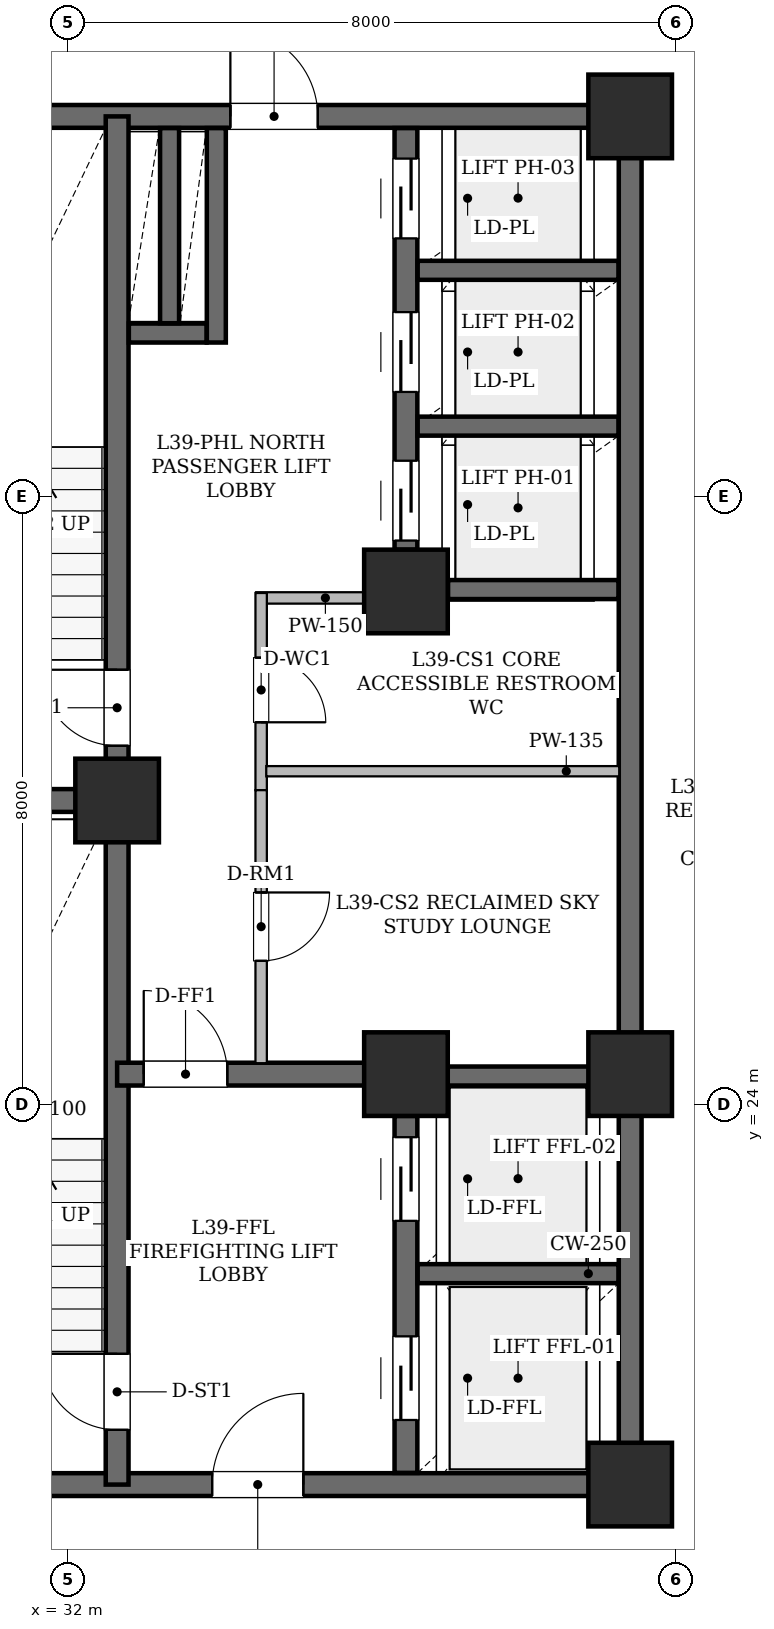
"""IFC4 building model, lengths in metres.
Left out: names, types, materials, properties, quantities, classifications, styles, units other than length and angle.
Written with IfcOpenShell. Run it as: python <this file> out.ifc"""

import sys

from ifc_helpers import new_model, si_unit, direction, frame, frame_2d, origin, origin_2d, place, context, subcontext, project, spatial, rectangle, hollow_rectangle, extrude, element, fill, save


model = new_model("IFC4")
c1 = context("Model", 3, precision=1e-05, world=origin(), true_north=direction((0.0, 1.0)))
c2 = subcontext(c1, "Body", "Model", "MODEL_VIEW")
j1 = project(units=[si_unit("LENGTHUNIT", "METRE"), si_unit("PLANEANGLEUNIT", "RADIAN")], contexts=[c1])
p1 = place(None, origin())
s1 = spatial("IfcSite", under=j1, at=p1, CompositionType="ELEMENT")
p2 = place(p1, origin())
s2 = spatial("IfcBuilding", under=s1, at=p2, CompositionType="ELEMENT")
p3 = place(p2, frame((0.0, 0.0, 155.9)))
s3 = spatial("IfcBuildingStorey", under=s2, at=p3, CompositionType="ELEMENT", Elevation=155.9)
for number, where, z_axis, x_axis in (
    (1, (32.65, 28.0, 0.0), (0.0, 0.0, 1.0), (1.0, 0.0, 0.0)),
    (2, (39.4, 19.0, 0.0), (0.0, 0.0, 1.0), (1.0, 0.0, 0.0)),
    (3, (36.45, 24.4, 0.0), (0.0, 0.0, 1.0), (1.0, 0.0, 0.0)),
    (4, (39.4, 24.4, 0.0), (0.0, 0.0, 1.0), (1.0, 0.0, 0.0)),
    (5, (36.45, 30.75, 0.0), (0.0, 0.0, 1.0), (1.0, 0.0, 0.0)),
    (6, (39.4, 37.0, 0.0), (0.0, 0.0, 1.0), (1.0, 0.0, 0.0)),
):
    element("IfcColumn", number, at=place(p3, frame(where, z_axis=z_axis, x_axis=x_axis)), inside=s3, PredefinedType="COLUMN", context=c2, shape_type="SweptSolid", body=[
        extrude(hollow_rectangle(XDim=1.1, YDim=1.1, WallThickness=0.055, at=origin_2d()), origin(), (0.0, 0.0, 1.0), 3.65),
    ])
p4 = place(p3, frame((29.0, 19.0, 0.0), z_axis=(0.0, 0.0, 1.0), x_axis=(1.0, 0.0, 0.0)))
e7 = element("IfcWall", 7, at=p4, inside=s3, PredefinedType="SHEAR", context=c2, shape_type="SweptSolid", body=[
    extrude(rectangle(XDim=10.4, YDim=0.3, at=frame_2d((5.2, 0.0))), origin(), (0.0, 0.0, 1.0), 3.43),
])
p5 = place(p4, frame((4.9, 0.0, 0.0)))
e8 = element("IfcOpeningElement", 8, at=p5, cuts=e7, PredefinedType="OPENING", context=c2, shape_type="SweptSolid", body=[
    extrude(rectangle(XDim=1.2, YDim=2.15, at=frame_2d((0.6, 1.075))), frame((0.0, 0.16, 0.0), z_axis=(0.0, -1.0, 0.0), x_axis=(1.0, 0.0, 0.0)), (0.0, 0.0, 1.0), 0.32),
])
p6 = place(p3, frame((29.0, 37.0, 0.0), z_axis=(0.0, 0.0, 1.0), x_axis=(1.0, 0.0, 0.0)))
e9 = element("IfcWall", 9, at=p6, inside=s3, PredefinedType="SHEAR", context=c2, shape_type="SweptSolid", body=[
    extrude(rectangle(XDim=10.4, YDim=0.3, at=frame_2d((5.2, 0.0))), origin(), (0.0, 0.0, 1.0), 3.43),
])
p7 = place(p6, frame((5.14, 0.0, 0.0)))
e10 = element("IfcOpeningElement", 10, at=p7, cuts=e9, PredefinedType="OPENING", context=c2, shape_type="SweptSolid", body=[
    extrude(rectangle(XDim=1.15, YDim=2.2, at=frame_2d((0.575, 1.1))), frame((0.0, 0.16, 0.0), z_axis=(0.0, -1.0, 0.0), x_axis=(1.0, 0.0, 0.0)), (0.0, 0.0, 1.0), 0.32),
])
p8 = place(p3, frame((39.4, 19.0, 0.0), z_axis=(0.0, 0.0, 1.0), x_axis=(0.0, 1.0, 0.0)))
e11 = element("IfcWall", 11, at=p8, inside=s3, PredefinedType="SHEAR", context=c2, shape_type="SweptSolid", body=[
    extrude(rectangle(XDim=5.4, YDim=0.3, at=frame_2d((2.7, 0.0))), origin(), (0.0, 0.0, 1.0), 3.43),
])
p9 = place(p3, frame((39.4, 24.4, 0.0), z_axis=(0.0, 0.0, 1.0), x_axis=(0.0, 1.0, 0.0)))
e12 = element("IfcWall", 12, at=p9, inside=s3, PredefinedType="SHEAR", context=c2, shape_type="SweptSolid", body=[
    extrude(rectangle(XDim=12.6, YDim=0.3, at=frame_2d((6.3, 0.0))), origin(), (0.0, 0.0, 1.0), 3.43),
])
p10 = place(p3, frame((32.65, 19.0, 0.0), z_axis=(0.0, 0.0, 1.0), x_axis=(0.0, 1.0, 0.0)))
e13 = element("IfcWall", 13, at=p10, inside=s3, PredefinedType="SHEAR", context=c2, shape_type="SweptSolid", body=[
    extrude(rectangle(XDim=9.0, YDim=0.3, at=frame_2d((4.5, 0.0))), origin(), (0.0, 0.0, 1.0), 3.43),
])
p11 = place(p10, frame((0.72, 0.0, 0.0)))
e14 = element("IfcOpeningElement", 14, at=p11, cuts=e13, PredefinedType="OPENING", context=c2, shape_type="SweptSolid", body=[
    extrude(rectangle(XDim=1.0, YDim=2.15, at=frame_2d((0.5, 1.075))), frame((0.0, 0.16, 0.0), z_axis=(0.0, -1.0, 0.0), x_axis=(1.0, 0.0, 0.0)), (0.0, 0.0, 1.0), 0.32),
])
p12 = place(p3, frame((32.65, 28.0, 0.0), z_axis=(0.0, 0.0, 1.0), x_axis=(0.0, 1.0, 0.0)))
e15 = element("IfcWall", 15, at=p12, inside=s3, PredefinedType="SHEAR", context=c2, shape_type="SweptSolid", body=[
    extrude(rectangle(XDim=9.0, YDim=0.3, at=frame_2d((4.5, 0.0))), origin(), (0.0, 0.0, 1.0), 3.43),
])
p13 = place(p12, frame((0.72, 0.0, 0.0)))
e16 = element("IfcOpeningElement", 16, at=p13, cuts=e15, PredefinedType="OPENING", context=c2, shape_type="SweptSolid", body=[
    extrude(rectangle(XDim=1.0, YDim=2.15, at=frame_2d((0.5, 1.075))), frame((0.0, 0.16, 0.0), z_axis=(0.0, -1.0, 0.0), x_axis=(1.0, 0.0, 0.0)), (0.0, 0.0, 1.0), 0.32),
])
p14 = place(p3, frame((29.0, 28.0, 0.0), z_axis=(0.0, 0.0, 1.0), x_axis=(1.0, 0.0, 0.0)))
e17 = element("IfcWall", 17, at=p14, inside=s3, PredefinedType="SHEAR", context=c2, shape_type="SweptSolid", body=[
    extrude(rectangle(XDim=3.65, YDim=0.3, at=frame_2d((1.825, 0.0))), origin(), (0.0, 0.0, 1.0), 3.43),
])
p15 = place(p3, frame((32.65, 24.4, 0.0), z_axis=(0.0, 0.0, 1.0), x_axis=(1.0, 0.0, 0.0)))
e18 = element("IfcWall", 18, at=p15, inside=s3, PredefinedType="SHEAR", context=c2, shape_type="SweptSolid", body=[
    extrude(rectangle(XDim=3.8, YDim=0.3, at=frame_2d((1.9, 0.0))), origin(), (0.0, 0.0, 1.0), 3.43),
])
p16 = place(p15, frame((0.35, 0.0, 0.0)))
e19 = element("IfcOpeningElement", 19, at=p16, cuts=e18, PredefinedType="OPENING", context=c2, shape_type="SweptSolid", body=[
    extrude(rectangle(XDim=1.1, YDim=2.15, at=frame_2d((0.55, 1.075))), frame((0.0, 0.16, 0.0), z_axis=(0.0, -1.0, 0.0), x_axis=(1.0, 0.0, 0.0)), (0.0, 0.0, 1.0), 0.32),
])
p17 = place(p3, frame((36.45, 19.154, 0.0), z_axis=(0.0, 0.0, 1.0), x_axis=(0.0, 1.0, 0.0)))
e20 = element("IfcWall", 20, at=p17, inside=s3, PredefinedType="SHEAR", context=c2, shape_type="SweptSolid", body=[
    extrude(rectangle(XDim=4.696, YDim=0.3, at=frame_2d((2.348, 0.0))), origin(), (0.0, 0.0, 1.0), 3.43),
])
p18 = place(p17, frame((0.696, 0.0, 0.0)))
e21 = element("IfcOpeningElement", 21, at=p18, cuts=e20, PredefinedType="OPENING", context=c2, shape_type="SweptSolid", body=[
    extrude(rectangle(XDim=1.1, YDim=2.15, at=frame_2d((0.55, 1.075))), frame((0.0, 0.16, 0.0), z_axis=(0.0, -1.0, 0.0), x_axis=(1.0, 0.0, 0.0)), (0.0, 0.0, 1.0), 0.32),
])
p19 = place(p17, frame((3.316, 0.0, 0.0)))
e22 = element("IfcOpeningElement", 22, at=p19, cuts=e20, PredefinedType="OPENING", context=c2, shape_type="SweptSolid", body=[
    extrude(rectangle(XDim=1.1, YDim=2.15, at=frame_2d((0.55, 1.075))), frame((0.0, 0.16, 0.0), z_axis=(0.0, -1.0, 0.0), x_axis=(1.0, 0.0, 0.0)), (0.0, 0.0, 1.0), 0.32),
])
p20 = place(p3, frame((36.45, 31.3, 0.0), z_axis=(0.0, 0.0, 1.0), x_axis=(0.0, 1.0, 0.0)))
e23 = element("IfcWall", 23, at=p20, inside=s3, PredefinedType="SHEAR", context=c2, shape_type="SweptSolid", body=[
    extrude(rectangle(XDim=5.546, YDim=0.3, at=frame_2d((2.773, 0.0))), origin(), (0.0, 0.0, 1.0), 3.43),
])
p21 = place(p20, frame((0.12, 0.0, 0.0)))
e24 = element("IfcOpeningElement", 24, at=p21, cuts=e23, PredefinedType="OPENING", context=c2, shape_type="SweptSolid", body=[
    extrude(rectangle(XDim=1.05, YDim=2.15, at=frame_2d((0.525, 1.075))), frame((0.0, 0.16, 0.0), z_axis=(0.0, -1.0, 0.0), x_axis=(1.0, 0.0, 0.0)), (0.0, 0.0, 1.0), 0.32),
])
p22 = place(p20, frame((2.075, 0.0, 0.0)))
e25 = element("IfcOpeningElement", 25, at=p22, cuts=e23, PredefinedType="OPENING", context=c2, shape_type="SweptSolid", body=[
    extrude(rectangle(XDim=1.05, YDim=2.15, at=frame_2d((0.525, 1.075))), frame((0.0, 0.16, 0.0), z_axis=(0.0, -1.0, 0.0), x_axis=(1.0, 0.0, 0.0)), (0.0, 0.0, 1.0), 0.32),
])
p23 = place(p20, frame((4.095, 0.0, 0.0)))
e26 = element("IfcOpeningElement", 26, at=p23, cuts=e23, PredefinedType="OPENING", context=c2, shape_type="SweptSolid", body=[
    extrude(rectangle(XDim=1.05, YDim=2.15, at=frame_2d((0.525, 1.075))), frame((0.0, 0.16, 0.0), z_axis=(0.0, -1.0, 0.0), x_axis=(1.0, 0.0, 0.0)), (0.0, 0.0, 1.0), 0.32),
])
for number, where, z_axis, x_axis in (
    (27, (36.604, 21.775, 0.0), (0.0, 0.0, 1.0), (1.0, 0.0, 0.0)),
    (28, (36.604, 24.375, 0.0), (0.0, 0.0, 1.0), (1.0, 0.0, 0.0)),
):
    element("IfcWall", number, at=place(p3, frame(where, z_axis=z_axis, x_axis=x_axis)), inside=s3, PredefinedType="SHEAR", context=c2, shape_type="SweptSolid", body=[
        extrude(rectangle(XDim=2.642, YDim=0.25, at=frame_2d((1.321, 0.0))), origin(), (0.0, 0.0, 1.0), 3.43),
    ])
p24 = place(p3, frame((37.004, 30.775, 0.0), z_axis=(0.0, 0.0, 1.0), x_axis=(1.0, 0.0, 0.0)))
e29 = element("IfcWall", 29, at=p24, inside=s3, PredefinedType="SHEAR", context=c2, shape_type="SweptSolid", body=[
    extrude(rectangle(XDim=2.242, YDim=0.25, at=frame_2d((1.121, 0.0))), origin(), (0.0, 0.0, 1.0), 3.43),
])
for number, where, z_axis, x_axis in (
    (30, (36.604, 32.925, 0.0), (0.0, 0.0, 1.0), (1.0, 0.0, 0.0)),
    (31, (36.604, 34.975, 0.0), (0.0, 0.0, 1.0), (1.0, 0.0, 0.0)),
):
    element("IfcWall", number, at=place(p3, frame(where, z_axis=z_axis, x_axis=x_axis)), inside=s3, PredefinedType="SHEAR", context=c2, shape_type="SweptSolid", body=[
        extrude(rectangle(XDim=2.642, YDim=0.25, at=frame_2d((1.321, 0.0))), origin(), (0.0, 0.0, 1.0), 3.43),
    ])
p25 = place(p3, frame((33.955, 34.025, 0.0), z_axis=(0.0, 0.0, 1.0), x_axis=(0.0, 1.0, 0.0)))
e32 = element("IfcWall", 32, at=p25, inside=s3, PredefinedType="SHEAR", context=c2, shape_type="SweptSolid", body=[
    extrude(rectangle(XDim=2.821, YDim=0.25, at=frame_2d((1.411, 0.0))), origin(), (0.0, 0.0, 1.0), 3.43),
])
p26 = place(p3, frame((32.804, 34.15, 0.0), z_axis=(0.0, 0.0, 1.0), x_axis=(1.0, 0.0, 0.0)))
e33 = element("IfcWall", 33, at=p26, inside=s3, PredefinedType="SHEAR", context=c2, shape_type="SweptSolid", body=[
    extrude(rectangle(XDim=1.022, YDim=0.25, at=frame_2d((0.511, 0.0))), origin(), (0.0, 0.0, 1.0), 3.43),
])
p27 = place(p3, frame((33.34, 34.279, 0.0), z_axis=(0.0, 0.0, 1.0), x_axis=(0.0, 1.0, 0.0)))
e34 = element("IfcWall", 34, at=p27, inside=s3, PredefinedType="SHEAR", context=c2, shape_type="SweptSolid", body=[
    extrude(rectangle(XDim=2.567, YDim=0.25, at=frame_2d((1.283, 0.0))), origin(), (0.0, 0.0, 1.0), 3.43),
])
p28 = place(p3, frame((36.3, 30.665, 0.0), z_axis=(0.0, 0.0, 1.0), x_axis=(-1.0, 0.0, 0.0)))
e35 = element("IfcWall", 35, at=p28, inside=s3, PredefinedType="STANDARD", context=c2, shape_type="SweptSolid", body=[
    extrude(rectangle(XDim=1.82, YDim=0.15, at=frame_2d((0.91, 0.0))), origin(), (0.0, 0.0, 1.0), 3.43),
])
p29 = place(p3, frame((34.545, 30.73, 0.0), z_axis=(0.0, 0.0, 1.0), x_axis=(0.0, -1.0, 0.0)))
e36 = element("IfcWall", 36, at=p29, inside=s3, PredefinedType="STANDARD", context=c2, shape_type="SweptSolid", body=[
    extrude(rectangle(XDim=2.594, YDim=0.15, at=frame_2d((1.297, 0.0))), origin(), (0.0, 0.0, 1.0), 3.43),
])
p30 = place(p29, frame((0.851, 0.0, 0.0)))
e37 = element("IfcOpeningElement", 37, at=p30, cuts=e36, PredefinedType="OPENING", context=c2, shape_type="SweptSolid", body=[
    extrude(rectangle(XDim=0.85, YDim=2.1, at=frame_2d((0.425, 1.05))), frame((0.0, 0.085, 0.0), z_axis=(0.0, -1.0, 0.0), x_axis=(1.0, 0.0, 0.0)), (0.0, 0.0, 1.0), 0.17),
])
p31 = place(p3, frame((34.545, 28.136, 0.0), z_axis=(0.0, 0.0, 1.0), x_axis=(0.0, -1.0, 0.0)))
e38 = element("IfcWall", 38, at=p31, inside=s3, PredefinedType="STANDARD", context=c2, shape_type="SweptSolid", body=[
    extrude(rectangle(XDim=3.592, YDim=0.15, at=frame_2d((1.796, 0.0))), origin(), (0.0, 0.0, 1.0), 3.43),
])
p32 = place(p31, frame((1.346, 0.0, 0.0)))
e39 = element("IfcOpeningElement", 39, at=p32, cuts=e38, PredefinedType="OPENING", context=c2, shape_type="SweptSolid", body=[
    extrude(rectangle(XDim=0.9, YDim=2.1, at=frame_2d((0.45, 1.05))), frame((0.0, 0.085, 0.0), z_axis=(0.0, -1.0, 0.0), x_axis=(1.0, 0.0, 0.0)), (0.0, 0.0, 1.0), 0.17),
])
p33 = place(p3, frame((39.256, 28.385, 0.0), z_axis=(0.0, 0.0, 1.0), x_axis=(-1.0, 0.0, 0.0)))
e40 = element("IfcWall", 40, at=p33, inside=s3, PredefinedType="PARTITIONING", context=c2, shape_type="SweptSolid", body=[
    extrude(rectangle(XDim=4.644, YDim=0.135, at=frame_2d((2.322, 0.0))), origin(), (0.0, 0.0, 1.0), 3.43),
])
p34 = place(p11, origin())
e41 = element("IfcDoor", 41, at=p34, inside=s3, OperationType="SINGLE_SWING_RIGHT", PredefinedType="DOOR", context=c2, shape_type="SweptSolid", body=[
    extrude(rectangle(XDim=1.0, YDim=2.15, at=frame_2d((0.5, 1.075))), frame((0.0, 0.025, 0.0), z_axis=(0.0, -1.0, 0.0), x_axis=(1.0, 0.0, 0.0)), (0.0, 0.0, 1.0), 0.05),
])
fill(e14, e41)
p35 = place(p13, origin())
e42 = element("IfcDoor", 42, at=p35, inside=s3, OperationType="SINGLE_SWING_RIGHT", PredefinedType="DOOR", context=c2, shape_type="SweptSolid", body=[
    extrude(rectangle(XDim=1.0, YDim=2.15, at=frame_2d((0.5, 1.075))), frame((0.0, 0.025, 0.0), z_axis=(0.0, -1.0, 0.0), x_axis=(1.0, 0.0, 0.0)), (0.0, 0.0, 1.0), 0.05),
])
fill(e16, e42)
p36 = place(p16, origin())
e43 = element("IfcDoor", 43, at=p36, inside=s3, OperationType="SINGLE_SWING_LEFT", PredefinedType="DOOR", context=c2, shape_type="SweptSolid", body=[
    extrude(rectangle(XDim=1.1, YDim=2.15, at=frame_2d((0.55, 1.075))), frame((0.0, 0.025, 0.0), z_axis=(0.0, -1.0, 0.0), x_axis=(1.0, 0.0, 0.0)), (0.0, 0.0, 1.0), 0.05),
])
fill(e19, e43)
p37 = place(p5, origin())
e44 = element("IfcDoor", 44, at=p37, inside=s3, OperationType="SINGLE_SWING_RIGHT", PredefinedType="DOOR", context=c2, shape_type="SweptSolid", body=[
    extrude(rectangle(XDim=1.2, YDim=2.15, at=frame_2d((0.6, 1.075))), frame((0.0, 0.025, 0.0), z_axis=(0.0, -1.0, 0.0), x_axis=(1.0, 0.0, 0.0)), (0.0, 0.0, 1.0), 0.05),
])
fill(e8, e44)
p38 = place(p7, origin())
e45 = element("IfcDoor", 45, at=p38, inside=s3, OperationType="SINGLE_SWING_LEFT", PredefinedType="DOOR", context=c2, shape_type="SweptSolid", body=[
    extrude(rectangle(XDim=1.15, YDim=2.2, at=frame_2d((0.575, 1.1))), frame((0.0, 0.025, 0.0), z_axis=(0.0, -1.0, 0.0), x_axis=(1.0, 0.0, 0.0)), (0.0, 0.0, 1.0), 0.05),
])
fill(e10, e45)
p39 = place(p18, origin())
e46 = element("IfcDoor", 46, at=p39, inside=s3, OperationType="SLIDING_TO_LEFT", PredefinedType="DOOR", context=c2, shape_type="SweptSolid", body=[
    extrude(rectangle(XDim=1.1, YDim=2.15, at=frame_2d((0.55, 1.075))), frame((0.0, 0.025, 0.0), z_axis=(0.0, -1.0, 0.0), x_axis=(1.0, 0.0, 0.0)), (0.0, 0.0, 1.0), 0.05),
])
fill(e21, e46)
p40 = place(p19, origin())
e47 = element("IfcDoor", 47, at=p40, inside=s3, OperationType="SLIDING_TO_LEFT", PredefinedType="DOOR", context=c2, shape_type="SweptSolid", body=[
    extrude(rectangle(XDim=1.1, YDim=2.15, at=frame_2d((0.55, 1.075))), frame((0.0, 0.025, 0.0), z_axis=(0.0, -1.0, 0.0), x_axis=(1.0, 0.0, 0.0)), (0.0, 0.0, 1.0), 0.05),
])
fill(e22, e47)
p41 = place(p21, origin())
e48 = element("IfcDoor", 48, at=p41, inside=s3, OperationType="SLIDING_TO_LEFT", PredefinedType="DOOR", context=c2, shape_type="SweptSolid", body=[
    extrude(rectangle(XDim=1.05, YDim=2.15, at=frame_2d((0.525, 1.075))), frame((0.0, 0.025, 0.0), z_axis=(0.0, -1.0, 0.0), x_axis=(1.0, 0.0, 0.0)), (0.0, 0.0, 1.0), 0.05),
])
fill(e24, e48)
p42 = place(p22, origin())
e49 = element("IfcDoor", 49, at=p42, inside=s3, OperationType="SLIDING_TO_LEFT", PredefinedType="DOOR", context=c2, shape_type="SweptSolid", body=[
    extrude(rectangle(XDim=1.05, YDim=2.15, at=frame_2d((0.525, 1.075))), frame((0.0, 0.025, 0.0), z_axis=(0.0, -1.0, 0.0), x_axis=(1.0, 0.0, 0.0)), (0.0, 0.0, 1.0), 0.05),
])
fill(e25, e49)
p43 = place(p23, origin())
e50 = element("IfcDoor", 50, at=p43, inside=s3, OperationType="SLIDING_TO_LEFT", PredefinedType="DOOR", context=c2, shape_type="SweptSolid", body=[
    extrude(rectangle(XDim=1.05, YDim=2.15, at=frame_2d((0.525, 1.075))), frame((0.0, 0.025, 0.0), z_axis=(0.0, -1.0, 0.0), x_axis=(1.0, 0.0, 0.0)), (0.0, 0.0, 1.0), 0.05),
])
fill(e26, e50)
p44 = place(p30, origin())
e51 = element("IfcDoor", 51, at=p44, inside=s3, OperationType="SINGLE_SWING_RIGHT", PredefinedType="DOOR", context=c2, shape_type="SweptSolid", body=[
    extrude(rectangle(XDim=0.85, YDim=2.1, at=frame_2d((0.425, 1.05))), frame((0.0, 0.025, 0.0), z_axis=(0.0, -1.0, 0.0), x_axis=(1.0, 0.0, 0.0)), (0.0, 0.0, 1.0), 0.05),
])
fill(e37, e51)
p45 = place(p32, origin())
e52 = element("IfcDoor", 52, at=p45, inside=s3, OperationType="SINGLE_SWING_LEFT", PredefinedType="DOOR", context=c2, shape_type="SweptSolid", body=[
    extrude(rectangle(XDim=0.9, YDim=2.1, at=frame_2d((0.45, 1.05))), frame((0.0, 0.025, 0.0), z_axis=(0.0, -1.0, 0.0), x_axis=(1.0, 0.0, 0.0)), (0.0, 0.0, 1.0), 0.05),
])
fill(e39, e52)
save(model, sys.argv[1])
